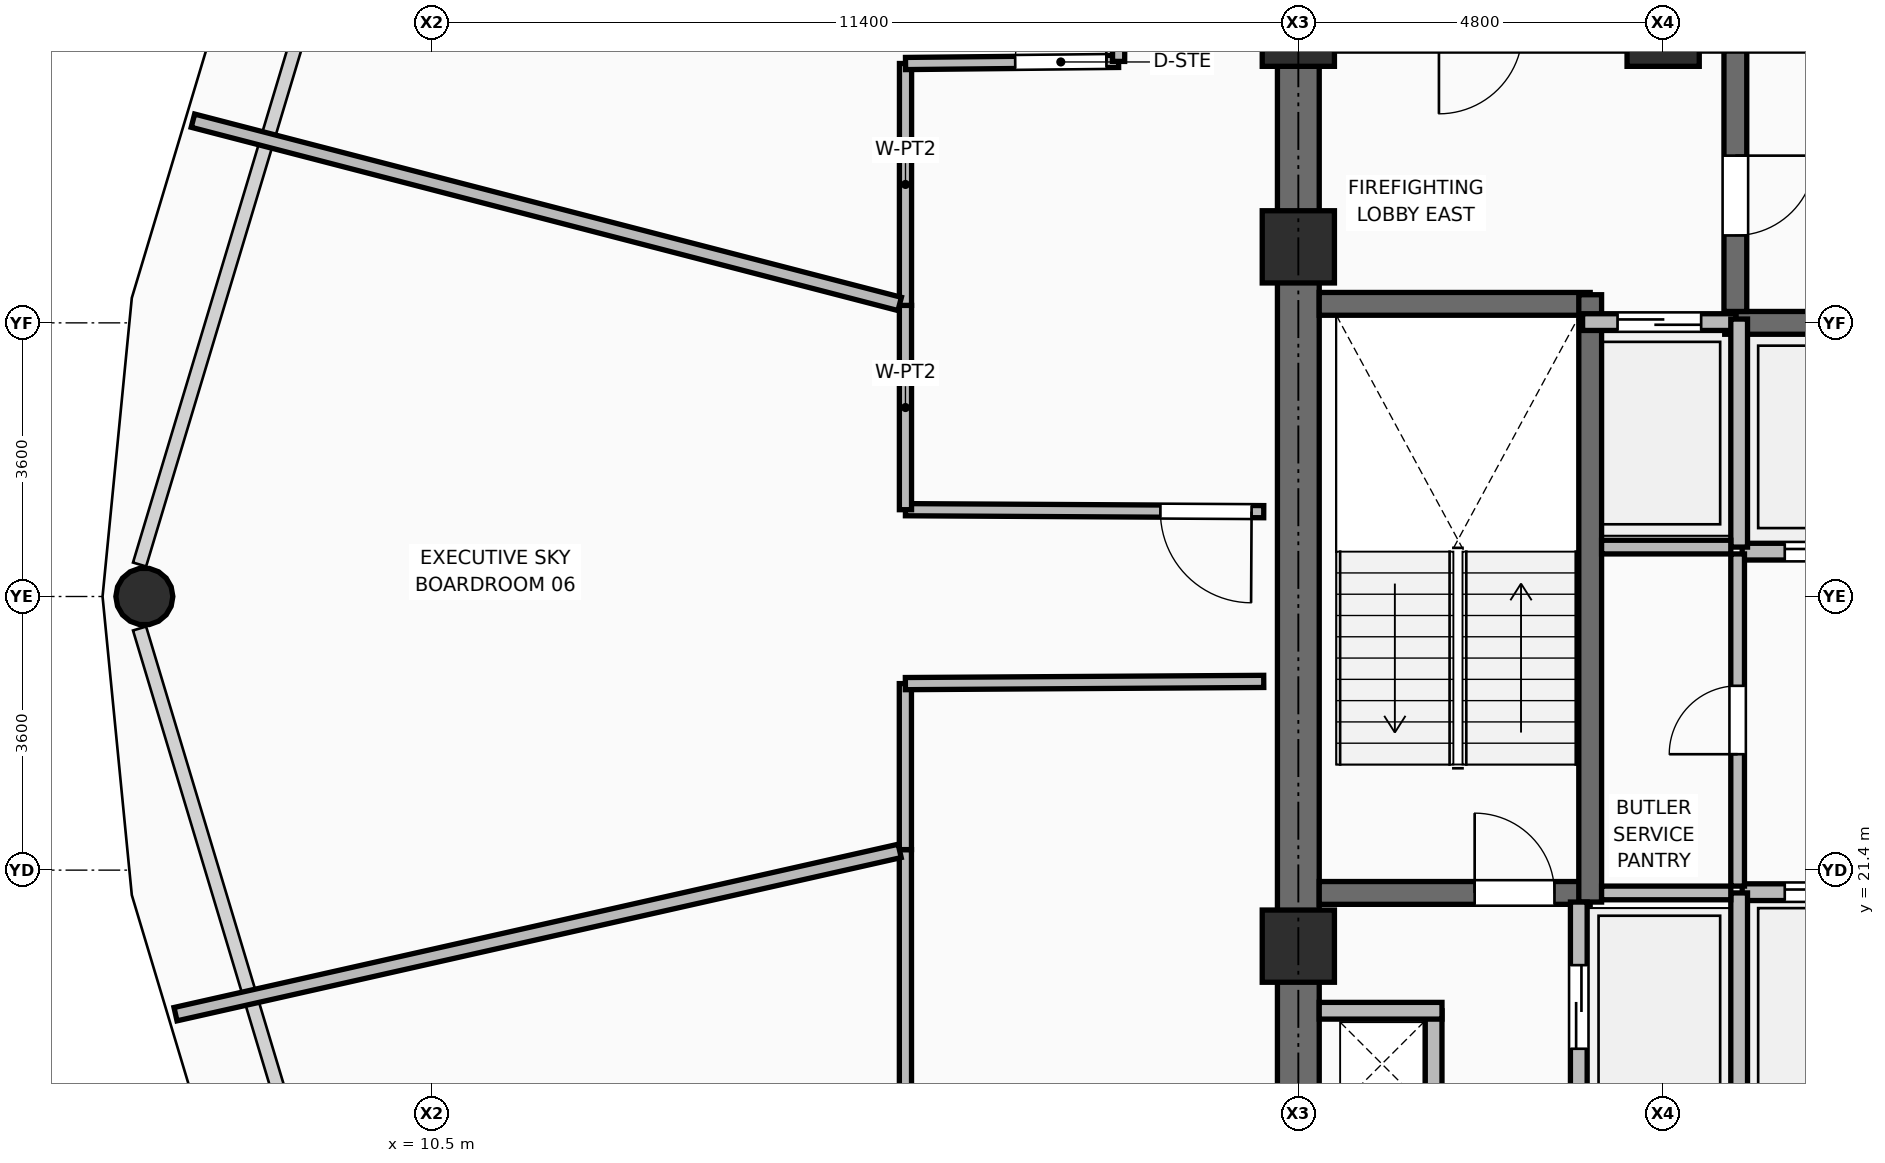
"""IFC4 building model, lengths in metres.
Left out: names, types, materials, properties, quantities, classifications, styles, units other than length and angle.
Written with IfcOpenShell. Run it as: python <this file> out.ifc"""

import sys

from ifc_helpers import new_model, si_unit, direction, frame, frame_2d, origin, origin_2d, place, context, subcontext, project, spatial, rectangle, hollow_circle, extrude, element, fill, save


model = new_model("IFC4")
c1 = context("Model", 3, precision=1e-05, world=origin(), true_north=direction((0.0, 1.0)))
c2 = subcontext(c1, "Body", "Model", "MODEL_VIEW")
j1 = project(units=[si_unit("LENGTHUNIT", "METRE"), si_unit("PLANEANGLEUNIT", "RADIAN")], contexts=[c1])
p1 = place(None, origin())
s1 = spatial("IfcSite", under=j1, at=p1, CompositionType="ELEMENT")
p2 = place(p1, origin())
s2 = spatial("IfcBuilding", under=s1, at=p2, CompositionType="ELEMENT")
p3 = place(p2, frame((0.0, 0.0, 160.95)))
s3 = spatial("IfcBuildingStorey", under=s2, at=p3, CompositionType="ELEMENT", Elevation=160.95)
for number, where, z_axis, x_axis in (
    (1, (21.9, 20.4, 0.0), (0.0, 0.0, 1.0), (1.0, 0.0, 0.0)),
    (2, (21.9, 29.6, 0.0), (0.0, 0.0, 1.0), (1.0, 0.0, 0.0)),
    (3, (21.9, 32.45, 0.0), (0.0, 0.0, 1.0), (1.0, 0.0, 0.0)),
    (4, (26.7, 32.45, 0.0), (0.0, 0.0, 1.0), (1.0, 0.0, 0.0)),
):
    element("IfcColumn", number, at=place(p3, frame(where, z_axis=z_axis, x_axis=x_axis)), inside=s3, PredefinedType="COLUMN", context=c2, shape_type="SweptSolid", body=[
        extrude(rectangle(XDim=0.95, YDim=0.95, at=origin_2d()), origin(), (0.0, 0.0, 1.0), 3.75),
    ])
p4 = place(p3, frame((6.717, 25.0, 0.0), z_axis=(0.069040907856, 0.0, 0.997613829617), x_axis=(0.0, 1.0, 0.0)))
e5 = element("IfcColumn", 5, at=p4, inside=s3, PredefinedType="COLUMN", context=c2, shape_type="SweptSolid", body=[
    extrude(hollow_circle(Radius=0.375, WallThickness=0.035, at=origin_2d()), origin(), (0.0, 0.0, 1.0), 3.579),
])
p5 = place(p3, frame((21.9, 18.075, 0.0), z_axis=(0.0, 0.0, 1.0), x_axis=(0.0, 1.0, 0.0)))
e6 = element("IfcWall", 6, at=p5, inside=s3, PredefinedType="SHEAR", context=c2, shape_type="SweptSolid", body=[
    extrude(rectangle(XDim=14.1, YDim=0.55, at=frame_2d((7.05, 0.0))), origin(), (0.0, 0.0, 1.0), 3.57),
])
p6 = place(p3, frame((22.175, 21.1, 0.0), z_axis=(0.0, 0.0, 1.0), x_axis=(1.0, 0.0, 0.0)))
e7 = element("IfcWall", 7, at=p6, inside=s3, PredefinedType="SHEAR", context=c2, shape_type="SweptSolid", body=[
    extrude(rectangle(XDim=3.565, YDim=0.3, at=frame_2d((1.782, 0.0))), origin(), (0.0, 0.0, 1.0), 3.57),
])
p7 = place(p6, frame((2.045, 0.0, 0.0)))
e8 = element("IfcOpeningElement", 8, at=p7, cuts=e7, PredefinedType="OPENING", context=c2, shape_type="SweptSolid", body=[
    extrude(rectangle(XDim=1.05, YDim=2.1, at=frame_2d((0.525, 1.05))), frame((0.0, 0.16, 0.0), z_axis=(0.0, -1.0, 0.0), x_axis=(1.0, 0.0, 0.0)), (0.0, 0.0, 1.0), 0.32),
])
p8 = place(p3, frame((22.175, 28.85, 0.0), z_axis=(0.0, 0.0, 1.0), x_axis=(1.0, 0.0, 0.0)))
e9 = element("IfcWall", 9, at=p8, inside=s3, PredefinedType="SHEAR", context=c2, shape_type="SweptSolid", body=[
    extrude(rectangle(XDim=3.565, YDim=0.3, at=frame_2d((1.782, 0.0))), origin(), (0.0, 0.0, 1.0), 3.57),
])
p9 = place(p3, frame((25.74, 20.98, 0.0), z_axis=(0.0, 0.0, 1.0), x_axis=(0.0, 1.0, 0.0)))
e10 = element("IfcWall", 10, at=p9, inside=s3, PredefinedType="SHEAR", context=c2, shape_type="SweptSolid", body=[
    extrude(rectangle(XDim=7.99, YDim=0.3, at=frame_2d((3.995, 0.0))), origin(), (0.0, 0.0, 1.0), 3.57),
])
p10 = place(p3, frame((27.51, 28.6, 0.0), z_axis=(0.0, 0.0, 1.0), x_axis=(1.0, 0.0, 0.0)))
e11 = element("IfcWall", 11, at=p10, inside=s3, PredefinedType="SHEAR", context=c2, shape_type="SweptSolid", body=[
    extrude(rectangle(XDim=8.03, YDim=0.3, at=frame_2d((4.015, 0.0))), origin(), (0.0, 0.0, 1.0), 3.57),
])
p11 = place(p3, frame((27.65, 28.75, 0.0), z_axis=(0.0, 0.0, 1.0), x_axis=(0.0, 1.0, 0.0)))
e12 = element("IfcWall", 12, at=p11, inside=s3, PredefinedType="SHEAR", context=c2, shape_type="SweptSolid", body=[
    extrude(rectangle(XDim=3.425, YDim=0.3, at=frame_2d((1.712, 0.0))), origin(), (0.0, 0.0, 1.0), 3.57),
])
p12 = place(p11, frame((1.0, 0.0, 0.0)))
e13 = element("IfcOpeningElement", 13, at=p12, cuts=e12, PredefinedType="OPENING", context=c2, shape_type="SweptSolid", body=[
    extrude(rectangle(XDim=1.05, YDim=2.1, at=frame_2d((0.525, 1.05))), frame((0.0, 0.16, 0.0), z_axis=(0.0, -1.0, 0.0), x_axis=(1.0, 0.0, 0.0)), (0.0, 0.0, 1.0), 0.32),
])
p13 = place(p3, frame((23.68, 18.075, 0.0), z_axis=(0.0, 0.0, 1.0), x_axis=(0.0, 1.0, 0.0)))
e14 = element("IfcWall", 14, at=p13, inside=s3, PredefinedType="PARTITIONING", context=c2, shape_type="SweptSolid", body=[
    extrude(rectangle(XDim=1.475, YDim=0.22, at=frame_2d((0.738, 0.0))), origin(), (0.0, 0.0, 1.0), 3.55),
])
p14 = place(p3, frame((22.175, 19.55, 0.0), z_axis=(0.0, 0.0, 1.0), x_axis=(1.0, 0.0, 0.0)))
e15 = element("IfcWall", 15, at=p14, inside=s3, PredefinedType="PARTITIONING", context=c2, shape_type="SweptSolid", body=[
    extrude(rectangle(XDim=1.615, YDim=0.22, at=frame_2d((0.808, 0.0))), origin(), (0.0, 0.0, 1.0), 2.595),
])
p15 = place(p3, frame((25.59, 18.22, 0.0), z_axis=(0.0, 0.0, 1.0), x_axis=(0.0, 1.0, 0.0)))
e16 = element("IfcWall", 16, at=p15, inside=s3, PredefinedType="PARTITIONING", context=c2, shape_type="SweptSolid", body=[
    extrude(rectangle(XDim=2.76, YDim=0.22, at=frame_2d((1.38, 0.0))), origin(), (0.0, 0.0, 1.0), 3.55),
])
p16 = place(p15, frame((0.83, 0.0, 0.0)))
e17 = element("IfcOpeningElement", 17, at=p16, cuts=e16, PredefinedType="OPENING", context=c2, shape_type="SweptSolid", body=[
    extrude(rectangle(XDim=1.1, YDim=2.2, at=frame_2d((0.55, 1.1))), frame((0.0, 0.12, 0.0), z_axis=(0.0, -1.0, 0.0), x_axis=(1.0, 0.0, 0.0)), (0.0, 0.0, 1.0), 0.24),
])
p17 = place(p3, frame((25.64, 28.61, 0.0), z_axis=(0.0, 0.0, 1.0), x_axis=(1.0, 0.0, 0.0)))
e18 = element("IfcWall", 18, at=p17, inside=s3, PredefinedType="PARTITIONING", context=c2, shape_type="SweptSolid", body=[
    extrude(rectangle(XDim=2.02, YDim=0.22, at=frame_2d((1.01, 0.0))), origin(), (0.0, 0.0, 1.0), 3.55),
])
p18 = place(p17, frame((0.46, 0.0, 0.0)))
e19 = element("IfcOpeningElement", 19, at=p18, cuts=e18, PredefinedType="OPENING", context=c2, shape_type="SweptSolid", body=[
    extrude(rectangle(XDim=1.1, YDim=2.2, at=frame_2d((0.55, 1.1))), frame((0.0, 0.12, 0.0), z_axis=(0.0, -1.0, 0.0), x_axis=(1.0, 0.0, 0.0)), (0.0, 0.0, 1.0), 0.24),
])
p19 = place(p3, frame((27.74, 21.11, 0.0), z_axis=(0.0, 0.0, 1.0), x_axis=(1.0, 0.0, 0.0)))
e20 = element("IfcWall", 20, at=p19, inside=s3, PredefinedType="PARTITIONING", context=c2, shape_type="SweptSolid", body=[
    extrude(rectangle(XDim=2.22, YDim=0.22, at=frame_2d((1.11, 0.0))), origin(), (0.0, 0.0, 1.0), 3.55),
])
p20 = place(p19, frame((0.56, 0.0, 0.0)))
e21 = element("IfcOpeningElement", 21, at=p20, cuts=e20, PredefinedType="OPENING", context=c2, shape_type="SweptSolid", body=[
    extrude(rectangle(XDim=1.1, YDim=2.2, at=frame_2d((0.55, 1.1))), frame((0.0, 0.12, 0.0), z_axis=(0.0, -1.0, 0.0), x_axis=(1.0, 0.0, 0.0)), (0.0, 0.0, 1.0), 0.24),
])
p21 = place(p3, frame((27.74, 25.59, 0.0), z_axis=(0.0, 0.0, 1.0), x_axis=(1.0, 0.0, 0.0)))
e22 = element("IfcWall", 22, at=p21, inside=s3, PredefinedType="PARTITIONING", context=c2, shape_type="SweptSolid", body=[
    extrude(rectangle(XDim=2.22, YDim=0.22, at=frame_2d((1.11, 0.0))), origin(), (0.0, 0.0, 1.0), 3.55),
])
p22 = place(p21, frame((0.56, 0.0, 0.0)))
e23 = element("IfcOpeningElement", 23, at=p22, cuts=e22, PredefinedType="OPENING", context=c2, shape_type="SweptSolid", body=[
    extrude(rectangle(XDim=1.1, YDim=2.2, at=frame_2d((0.55, 1.1))), frame((0.0, 0.12, 0.0), z_axis=(0.0, -1.0, 0.0), x_axis=(1.0, 0.0, 0.0)), (0.0, 0.0, 1.0), 0.24),
])
p23 = place(p3, frame((27.7, 18.15, 0.0), z_axis=(0.0, 0.0, 1.0), x_axis=(0.0, 1.0, 0.0)))
e24 = element("IfcWall", 24, at=p23, inside=s3, PredefinedType="PARTITIONING", context=c2, shape_type="SweptSolid", body=[
    extrude(rectangle(XDim=2.95, YDim=0.22, at=frame_2d((1.475, 0.0))), origin(), (0.0, 0.0, 1.0), 3.55),
])
p24 = place(p3, frame((27.7, 25.65, 0.0), z_axis=(0.0, 0.0, 1.0), x_axis=(0.0, 1.0, 0.0)))
e25 = element("IfcWall", 25, at=p24, inside=s3, PredefinedType="PARTITIONING", context=c2, shape_type="SweptSolid", body=[
    extrude(rectangle(XDim=3.0, YDim=0.22, at=frame_2d((1.5, 0.0))), origin(), (0.0, 0.0, 1.0), 3.55),
])
for number, where, z_axis, x_axis in (
    (26, (25.89, 21.1, 0.0), (0.0, 0.0, 1.0), (1.0, 0.0, 0.0)),
    (27, (25.89, 25.65, 0.0), (0.0, 0.0, 1.0), (1.0, 0.0, 0.0)),
):
    element("IfcWall", number, at=place(p3, frame(where, z_axis=z_axis, x_axis=x_axis)), inside=s3, PredefinedType="PARTITIONING", context=c2, shape_type="SweptSolid", body=[
        extrude(rectangle(XDim=1.7, YDim=0.18, at=frame_2d((0.85, 0.0))), origin(), (0.0, 0.0, 1.0), 3.55),
    ])
p25 = place(p3, frame((27.68, 21.19, 0.0), z_axis=(0.0, 0.0, 1.0), x_axis=(0.0, 1.0, 0.0)))
e28 = element("IfcWall", 28, at=p25, inside=s3, PredefinedType="PARTITIONING", context=c2, shape_type="SweptSolid", body=[
    extrude(rectangle(XDim=4.37, YDim=0.18, at=frame_2d((2.185, 0.0))), origin(), (0.0, 0.0, 1.0), 3.55),
])
p26 = place(p25, frame((1.735, 0.0, 0.0)))
e29 = element("IfcOpeningElement", 29, at=p26, cuts=e28, PredefinedType="OPENING", context=c2, shape_type="SweptSolid", body=[
    extrude(rectangle(XDim=0.9, YDim=2.1, at=frame_2d((0.45, 1.05))), frame((0.0, 0.1, 0.0), z_axis=(0.0, -1.0, 0.0), x_axis=(1.0, 0.0, 0.0)), (0.0, 0.0, 1.0), 0.2),
])
p27 = place(p3, frame((21.445, 26.116, 0.0), z_axis=(0.0, 0.0, 1.0), x_axis=(-0.999984646479, 0.005541372271, 0.0)))
e30 = element("IfcWall", 30, at=p27, inside=s3, PredefinedType="PARTITIONING", context=c2, shape_type="SweptSolid", body=[
    extrude(rectangle(XDim=4.714, YDim=0.16, at=frame_2d((2.357, 0.0))), origin(), (0.0, 0.0, 1.0), 2.595),
])
p28 = place(p27, frame((0.16, 0.0, 0.0)))
e31 = element("IfcOpeningElement", 31, at=p28, cuts=e30, PredefinedType="OPENING", context=c2, shape_type="SweptSolid", body=[
    extrude(rectangle(XDim=1.2, YDim=2.1, at=frame_2d((0.6, 1.05))), frame((0.0, 0.09, 0.0), z_axis=(0.0, -1.0, 0.0), x_axis=(1.0, 0.0, 0.0)), (0.0, 0.0, 1.0), 0.18),
])
p29 = place(p3, frame((16.731, 26.142, 0.0), z_axis=(0.0, 0.0, 1.0), x_axis=(0.0, 1.0, 0.0)))
e32 = element("IfcWall", 32, at=p29, inside=s3, PredefinedType="PARTITIONING", context=c2, shape_type="SweptSolid", body=[
    extrude(rectangle(XDim=2.688, YDim=0.16, at=frame_2d((1.344, 0.0))), origin(), (0.0, 0.0, 1.0), 3.55),
])
p30 = place(p3, frame((16.731, 28.83, 0.0), z_axis=(0.0, 0.0, 1.0), x_axis=(0.000306913206, 0.999999952902, 0.0)))
e33 = element("IfcWall", 33, at=p30, inside=s3, PredefinedType="PARTITIONING", context=c2, shape_type="SweptSolid", body=[
    extrude(rectangle(XDim=3.182, YDim=0.16, at=frame_2d((1.591, 0.0))), origin(), (0.0, 0.0, 1.0), 3.55),
])
p31 = place(p3, frame((16.732, 32.012, 0.0), z_axis=(0.0, 0.0, 1.0), x_axis=(0.999949838147, 0.010016046632, 0.0)))
e34 = element("IfcWall", 34, at=p31, inside=s3, PredefinedType="PARTITIONING", context=c2, shape_type="SweptSolid", body=[
    extrude(rectangle(XDim=2.803, YDim=0.16, at=frame_2d((1.402, 0.0))), origin(), (0.0, 0.0, 1.0), 3.55),
])
p32 = place(p31, frame((1.443, 0.0, 0.0)))
e35 = element("IfcOpeningElement", 35, at=p32, cuts=e34, PredefinedType="OPENING", context=c2, shape_type="SweptSolid", body=[
    extrude(rectangle(XDim=1.2, YDim=2.1, at=frame_2d((0.6, 1.05))), frame((0.0, 0.09, 0.0), z_axis=(0.0, -1.0, 0.0), x_axis=(1.0, 0.0, 0.0)), (0.0, 0.0, 1.0), 0.18),
])
p33 = place(p3, frame((19.535, 32.04, 0.0), z_axis=(0.0, 0.0, 1.0), x_axis=(0.006526585281, 0.999978701615, 0.0)))
e36 = element("IfcWall", 36, at=p33, inside=s3, PredefinedType="PARTITIONING", context=c2, shape_type="SweptSolid", body=[
    extrude(rectangle(XDim=2.768, YDim=0.16, at=frame_2d((1.384, 0.0))), origin(), (0.0, 0.0, 1.0), 3.006),
])
p34 = place(p3, frame((16.731, 17.992, 0.0), z_axis=(0.0, 0.0, 1.0), x_axis=(-0.000265516088, 0.999999964751, 0.0)))
e37 = element("IfcWall", 37, at=p34, inside=s3, PredefinedType="PARTITIONING", context=c2, shape_type="SweptSolid", body=[
    extrude(rectangle(XDim=3.678, YDim=0.16, at=frame_2d((1.839, 0.0))), origin(), (0.0, 0.0, 1.0), 3.55),
])
p35 = place(p3, frame((16.73, 21.67, 0.0), z_axis=(0.0, 0.0, 1.0), x_axis=(0.0, 1.0, 0.0)))
e38 = element("IfcWall", 38, at=p35, inside=s3, PredefinedType="PARTITIONING", context=c2, shape_type="SweptSolid", body=[
    extrude(rectangle(XDim=2.184, YDim=0.16, at=frame_2d((1.092, 0.0))), origin(), (0.0, 0.0, 1.0), 3.006),
])
p36 = place(p3, frame((16.73, 23.854, 0.0), z_axis=(0.0, 0.0, 1.0), x_axis=(0.999981017558, 0.00616153581, 0.0)))
e39 = element("IfcWall", 39, at=p36, inside=s3, PredefinedType="PARTITIONING", context=c2, shape_type="SweptSolid", body=[
    extrude(rectangle(XDim=4.715, YDim=0.16, at=frame_2d((2.357, 0.0))), origin(), (0.0, 0.0, 1.0), 2.595),
])
p37 = place(p3, frame((16.655, 28.849, 0.0), z_axis=(0.0, 0.0, 1.0), x_axis=(-0.967996440842, 0.250963922742, 0.0)))
e40 = element("IfcWall", 40, at=p37, inside=s3, PredefinedType="PARTITIONING", context=c2, shape_type="SweptSolid", body=[
    extrude(rectangle(XDim=9.606, YDim=0.18, at=frame_2d((4.803, 0.0))), origin(), (0.0, 0.0, 1.0), 2.852),
])
p38 = place(p3, frame((16.655, 21.653, 0.0), z_axis=(0.0, 0.0, 1.0), x_axis=(-0.975513709094, -0.219938635466, 0.0)))
e41 = element("IfcWall", 41, at=p38, inside=s3, PredefinedType="PARTITIONING", context=c2, shape_type="SweptSolid", body=[
    extrude(rectangle(XDim=9.767, YDim=0.18, at=frame_2d((4.884, 0.0))), origin(), (0.0, 0.0, 1.0), 2.852),
])
p39 = place(p7, origin())
e42 = element("IfcDoor", 42, at=p39, inside=s3, OperationType="SINGLE_SWING_LEFT", PredefinedType="DOOR", context=c2, shape_type="SweptSolid", body=[
    extrude(rectangle(XDim=1.05, YDim=2.1, at=frame_2d((0.525, 1.05))), frame((0.0, 0.025, 0.0), z_axis=(0.0, -1.0, 0.0), x_axis=(1.0, 0.0, 0.0)), (0.0, 0.0, 1.0), 0.05),
])
fill(e8, e42)
p40 = place(p12, frame((1.05, 0.0, 0.0), z_axis=(0.0, 0.0, 1.0), x_axis=(-1.0, 0.0, 0.0)))
e43 = element("IfcDoor", 43, at=p40, inside=s3, OperationType="SINGLE_SWING_LEFT", PredefinedType="DOOR", context=c2, shape_type="SweptSolid", body=[
    extrude(rectangle(XDim=1.05, YDim=2.1, at=frame_2d((0.525, 1.05))), frame((0.0, 0.025, 0.0), z_axis=(0.0, -1.0, 0.0), x_axis=(1.0, 0.0, 0.0)), (0.0, 0.0, 1.0), 0.05),
])
fill(e13, e43)
p41 = place(p16, origin())
e44 = element("IfcDoor", 44, at=p41, inside=s3, OperationType="DOUBLE_DOOR_SLIDING", PredefinedType="DOOR", context=c2, shape_type="SweptSolid", body=[
    extrude(rectangle(XDim=1.1, YDim=2.2, at=frame_2d((0.55, 1.1))), frame((0.0, 0.025, 0.0), z_axis=(0.0, -1.0, 0.0), x_axis=(1.0, 0.0, 0.0)), (0.0, 0.0, 1.0), 0.05),
])
fill(e17, e44)
p42 = place(p18, origin())
e45 = element("IfcDoor", 45, at=p42, inside=s3, OperationType="DOUBLE_DOOR_SLIDING", PredefinedType="DOOR", context=c2, shape_type="SweptSolid", body=[
    extrude(rectangle(XDim=1.1, YDim=2.2, at=frame_2d((0.55, 1.1))), frame((0.0, 0.025, 0.0), z_axis=(0.0, -1.0, 0.0), x_axis=(1.0, 0.0, 0.0)), (0.0, 0.0, 1.0), 0.05),
])
fill(e19, e45)
p43 = place(p20, origin())
e46 = element("IfcDoor", 46, at=p43, inside=s3, OperationType="DOUBLE_DOOR_SLIDING", PredefinedType="DOOR", context=c2, shape_type="SweptSolid", body=[
    extrude(rectangle(XDim=1.1, YDim=2.2, at=frame_2d((0.55, 1.1))), frame((0.0, 0.025, 0.0), z_axis=(0.0, -1.0, 0.0), x_axis=(1.0, 0.0, 0.0)), (0.0, 0.0, 1.0), 0.05),
])
fill(e21, e46)
p44 = place(p22, frame((1.1, 0.0, 0.0), z_axis=(0.0, 0.0, 1.0), x_axis=(-1.0, 0.0, 0.0)))
e47 = element("IfcDoor", 47, at=p44, inside=s3, OperationType="DOUBLE_DOOR_SLIDING", PredefinedType="DOOR", context=c2, shape_type="SweptSolid", body=[
    extrude(rectangle(XDim=1.1, YDim=2.2, at=frame_2d((0.55, 1.1))), frame((0.0, 0.025, 0.0), z_axis=(0.0, -1.0, 0.0), x_axis=(1.0, 0.0, 0.0)), (0.0, 0.0, 1.0), 0.05),
])
fill(e23, e47)
p45 = place(p26, origin())
e48 = element("IfcDoor", 48, at=p45, inside=s3, OperationType="SINGLE_SWING_LEFT", PredefinedType="DOOR", context=c2, shape_type="SweptSolid", body=[
    extrude(rectangle(XDim=0.9, YDim=2.1, at=frame_2d((0.45, 1.05))), frame((0.0, 0.025, 0.0), z_axis=(0.0, -1.0, 0.0), x_axis=(1.0, 0.0, 0.0)), (0.0, 0.0, 1.0), 0.05),
])
fill(e29, e48)
p46 = place(p32, origin())
e49 = element("IfcDoor", 49, at=p46, inside=s3, OperationType="SINGLE_SWING_RIGHT", PredefinedType="DOOR", context=c2, shape_type="SweptSolid", body=[
    extrude(rectangle(XDim=1.2, YDim=2.1, at=frame_2d((0.6, 1.05))), frame((0.0, 0.025, 0.0), z_axis=(0.0, -1.0, 0.0), x_axis=(1.0, 0.0, 0.0)), (0.0, 0.0, 1.0), 0.05),
])
fill(e35, e49)
p47 = place(p28, origin())
e50 = element("IfcDoor", 50, at=p47, inside=s3, OperationType="SINGLE_SWING_LEFT", PredefinedType="DOOR", context=c2, shape_type="SweptSolid", body=[
    extrude(rectangle(XDim=1.2, YDim=2.1, at=frame_2d((0.6, 1.05))), frame((0.0, 0.025, 0.0), z_axis=(0.0, -1.0, 0.0), x_axis=(1.0, 0.0, 0.0)), (0.0, 0.0, 1.0), 0.05),
])
fill(e31, e50)
save(model, sys.argv[1])
